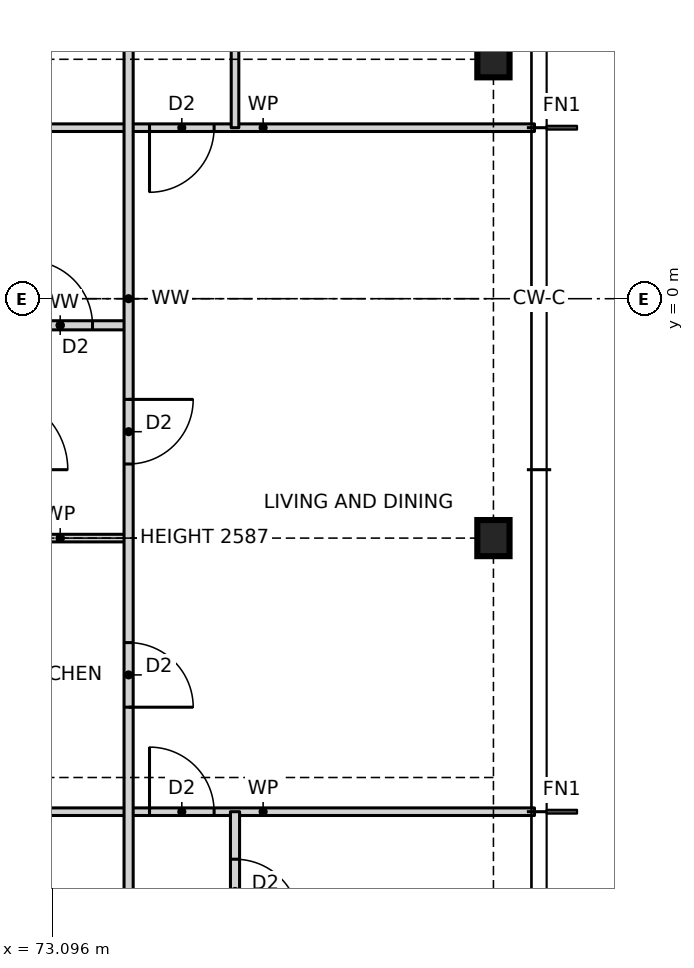
"""IFC4 building model, lengths in metres.
Left out: names, types, materials, properties, quantities, classifications, styles, units other than length and angle.
Written with IfcOpenShell. Run it as: python <this file> out.ifc"""

import sys

from ifc_helpers import new_model, si_unit, direction, frame, frame_2d, origin, origin_2d, place, context, subcontext, project, spatial, rectangle, i_section, extrude, element, fill, save


model = new_model("IFC4")
c1 = context("Model", 3, precision=1e-05, world=origin(), true_north=direction((0.0, 1.0)))
c2 = subcontext(c1, "Body", "Model", "MODEL_VIEW")
j1 = project(units=[si_unit("LENGTHUNIT", "METRE"), si_unit("PLANEANGLEUNIT", "RADIAN")], contexts=[c1])
p1 = place(None, origin())
s1 = spatial("IfcSite", under=j1, at=p1, CompositionType="ELEMENT")
p2 = place(p1, origin())
s2 = spatial("IfcBuilding", under=s1, at=p2, CompositionType="ELEMENT")
p3 = place(p2, frame((0.0, 0.0, 22.0)))
s3 = spatial("IfcBuildingStorey", under=s2, at=p3, CompositionType="ELEMENT", Elevation=22.0)
for number, where, z_axis, x_axis in (
    (1, (78.9, -3.15, 0.0), (0.0, 0.0, 1.0), (1.0, 0.0, 0.0)),
    (2, (78.9, 3.15, 0.0), (0.0, 0.0, 1.0), (1.0, 0.0, 0.0)),
):
    element("IfcColumn", number, at=place(p3, frame(where, z_axis=z_axis, x_axis=x_axis)), inside=s3, PredefinedType="COLUMN", context=c2, shape_type="SweptSolid", body=[
        extrude(i_section(OverallWidth=0.424, OverallDepth=0.475, WebThickness=0.048, FlangeThickness=0.077, at=origin_2d()), origin(), (0.0, 0.0, 1.0), 3.5),
    ])
p4 = place(p3, frame((72.3, -6.75, 0.0), z_axis=(0.0, 0.0, 1.0), x_axis=(1.0, 0.0, 0.0)))
e3 = element("IfcWall", 3, at=p4, inside=s3, PredefinedType="PARTITIONING", context=c2, shape_type="SweptSolid", body=[
    extrude(rectangle(XDim=7.14, YDim=0.1, at=frame_2d((3.57, 0.0))), origin(), (0.0, 0.0, 1.0), 3.27),
])
p5 = place(p4, frame((2.075, 0.0, 0.0)))
e4 = element("IfcOpeningElement", 4, at=p5, cuts=e3, PredefinedType="OPENING", context=c2, shape_type="SweptSolid", body=[
    extrude(rectangle(XDim=0.85, YDim=2.1, at=frame_2d((0.425, 1.05))), frame((0.0, 0.06, 0.0), z_axis=(0.0, -1.0, 0.0), x_axis=(1.0, 0.0, 0.0)), (0.0, 0.0, 1.0), 0.12),
])
p6 = place(p3, frame((72.3, -3.15, 0.0), z_axis=(0.0, 0.0, 1.0), x_axis=(1.0, 0.0, 0.0)))
e5 = element("IfcWall", 5, at=p6, inside=s3, PredefinedType="PARTITIONING", context=c2, shape_type="SweptSolid", body=[
    extrude(rectangle(XDim=1.8, YDim=0.1, at=frame_2d((0.9, 0.0))), origin(), (0.0, 0.0, 1.0), 2.587),
])
p7 = place(p3, frame((72.3, -0.35, 0.0), z_axis=(0.0, 0.0, 1.0), x_axis=(1.0, 0.0, 0.0)))
e6 = element("IfcWall", 6, at=p7, inside=s3, PredefinedType="PARTITIONING", context=c2, shape_type="SweptSolid", body=[
    extrude(rectangle(XDim=1.8, YDim=0.12, at=frame_2d((0.9, 0.0))), origin(), (0.0, 0.0, 1.0), 3.27),
])
p8 = place(p7, frame((0.475, 0.0, 0.0)))
e7 = element("IfcOpeningElement", 7, at=p8, cuts=e6, PredefinedType="OPENING", context=c2, shape_type="SweptSolid", body=[
    extrude(rectangle(XDim=0.85, YDim=2.1, at=frame_2d((0.425, 1.05))), frame((0.0, 0.07, 0.0), z_axis=(0.0, -1.0, 0.0), x_axis=(1.0, 0.0, 0.0)), (0.0, 0.0, 1.0), 0.14),
])
p9 = place(p3, frame((72.3, 2.25, 0.0), z_axis=(0.0, 0.0, 1.0), x_axis=(1.0, 0.0, 0.0)))
e8 = element("IfcWall", 8, at=p9, inside=s3, PredefinedType="PARTITIONING", context=c2, shape_type="SweptSolid", body=[
    extrude(rectangle(XDim=7.14, YDim=0.1, at=frame_2d((3.57, 0.0))), origin(), (0.0, 0.0, 1.0), 3.27),
])
p10 = place(p9, frame((2.075, 0.0, 0.0)))
e9 = element("IfcOpeningElement", 9, at=p10, cuts=e8, PredefinedType="OPENING", context=c2, shape_type="SweptSolid", body=[
    extrude(rectangle(XDim=0.85, YDim=2.1, at=frame_2d((0.425, 1.05))), frame((0.0, 0.06, 0.0), z_axis=(0.0, -1.0, 0.0), x_axis=(1.0, 0.0, 0.0)), (0.0, 0.0, 1.0), 0.12),
])
p11 = place(p3, frame((75.5, -13.45, 0.0), z_axis=(0.0, 0.0, 1.0), x_axis=(0.0, 1.0, 0.0)))
e10 = element("IfcWall", 10, at=p11, inside=s3, PredefinedType="PARTITIONING", context=c2, shape_type="SweptSolid", body=[
    extrude(rectangle(XDim=6.7, YDim=0.12, at=frame_2d((3.35, 0.0))), origin(), (0.0, 0.0, 1.0), 3.27),
])
p12 = place(p11, frame((5.225, 0.0, 0.0)))
e11 = element("IfcOpeningElement", 11, at=p12, cuts=e10, PredefinedType="OPENING", context=c2, shape_type="SweptSolid", body=[
    extrude(rectangle(XDim=0.85, YDim=2.1, at=frame_2d((0.425, 1.05))), frame((0.0, 0.07, 0.0), z_axis=(0.0, -1.0, 0.0), x_axis=(1.0, 0.0, 0.0)), (0.0, 0.0, 1.0), 0.14),
])
p13 = place(p11, frame((0.675, 0.0, 0.0)))
e12 = element("IfcOpeningElement", 12, at=p13, cuts=e10, PredefinedType="OPENING", context=c2, shape_type="SweptSolid", body=[
    extrude(rectangle(XDim=0.85, YDim=2.1, at=frame_2d((0.425, 1.05))), frame((0.0, 0.07, 0.0), z_axis=(0.0, -1.0, 0.0), x_axis=(1.0, 0.0, 0.0)), (0.0, 0.0, 1.0), 0.14),
])
p14 = place(p3, frame((75.5, 2.25, 0.0), z_axis=(0.0, 0.0, 1.0), x_axis=(0.0, 1.0, 0.0)))
e13 = element("IfcWall", 13, at=p14, inside=s3, PredefinedType="PARTITIONING", context=c2, shape_type="SweptSolid", body=[
    extrude(rectangle(XDim=11.2, YDim=0.1, at=frame_2d((5.6, 0.0))), origin(), (0.0, 0.0, 1.0), 3.27),
])
p15 = place(p14, frame((1.825, 0.0, 0.0)))
e14 = element("IfcOpeningElement", 14, at=p15, cuts=e13, PredefinedType="OPENING", context=c2, shape_type="SweptSolid", body=[
    extrude(rectangle(XDim=0.85, YDim=2.1, at=frame_2d((0.425, 1.05))), frame((0.0, 0.06, 0.0), z_axis=(0.0, -1.0, 0.0), x_axis=(1.0, 0.0, 0.0)), (0.0, 0.0, 1.0), 0.12),
])
p16 = place(p14, frame((6.325, 0.0, 0.0)))
e15 = element("IfcOpeningElement", 15, at=p16, cuts=e13, PredefinedType="OPENING", context=c2, shape_type="SweptSolid", body=[
    extrude(rectangle(XDim=0.85, YDim=2.1, at=frame_2d((0.425, 1.05))), frame((0.0, 0.06, 0.0), z_axis=(0.0, -1.0, 0.0), x_axis=(1.0, 0.0, 0.0)), (0.0, 0.0, 1.0), 0.12),
])
p17 = place(p14, frame((9.675, 0.0, 0.0)))
e16 = element("IfcOpeningElement", 16, at=p17, cuts=e13, PredefinedType="OPENING", context=c2, shape_type="SweptSolid", body=[
    extrude(rectangle(XDim=0.85, YDim=2.1, at=frame_2d((0.425, 1.05))), frame((0.0, 0.06, 0.0), z_axis=(0.0, -1.0, 0.0), x_axis=(1.0, 0.0, 0.0)), (0.0, 0.0, 1.0), 0.12),
])
p18 = place(p3, frame((74.1, -12.614, 0.0), z_axis=(0.0, 0.0, 1.0), x_axis=(0.0, 1.0, 0.0)))
e17 = element("IfcWall", 17, at=p18, inside=s3, PredefinedType="PARTITIONING", context=c2, shape_type="SweptSolid", body=[
    extrude(rectangle(XDim=25.228, YDim=0.12, at=frame_2d((12.614, 0.0))), origin(), (0.0, 0.0, 1.0), 3.27),
])
p19 = place(p18, frame((7.239, 0.0, 0.0)))
e18 = element("IfcOpeningElement", 18, at=p19, cuts=e17, PredefinedType="OPENING", context=c2, shape_type="SweptSolid", body=[
    extrude(rectangle(XDim=0.85, YDim=2.1, at=frame_2d((0.425, 1.05))), frame((0.0, 0.07, 0.0), z_axis=(0.0, -1.0, 0.0), x_axis=(1.0, 0.0, 0.0)), (0.0, 0.0, 1.0), 0.14),
])
p20 = place(p18, frame((10.439, 0.0, 0.0)))
e19 = element("IfcOpeningElement", 19, at=p20, cuts=e17, PredefinedType="OPENING", context=c2, shape_type="SweptSolid", body=[
    extrude(rectangle(XDim=0.85, YDim=2.1, at=frame_2d((0.425, 1.05))), frame((0.0, 0.07, 0.0), z_axis=(0.0, -1.0, 0.0), x_axis=(1.0, 0.0, 0.0)), (0.0, 0.0, 1.0), 0.14),
])
p21 = place(p18, frame((2.507, 0.0, 0.0)))
e20 = element("IfcOpeningElement", 20, at=p21, cuts=e17, PredefinedType="OPENING", context=c2, shape_type="SweptSolid", body=[
    extrude(rectangle(XDim=0.85, YDim=2.1, at=frame_2d((0.425, 1.05))), frame((0.0, 0.07, 0.0), z_axis=(0.0, -1.0, 0.0), x_axis=(1.0, 0.0, 0.0)), (0.0, 0.0, 1.0), 0.14),
])
p22 = place(p18, frame((16.639, 0.0, 0.0)))
e21 = element("IfcOpeningElement", 21, at=p22, cuts=e17, PredefinedType="OPENING", context=c2, shape_type="SweptSolid", body=[
    extrude(rectangle(XDim=0.85, YDim=2.1, at=frame_2d((0.425, 1.05))), frame((0.0, 0.07, 0.0), z_axis=(0.0, -1.0, 0.0), x_axis=(1.0, 0.0, 0.0)), (0.0, 0.0, 1.0), 0.14),
])
p23 = place(p18, frame((21.821, 0.0, 0.0)))
e22 = element("IfcOpeningElement", 22, at=p23, cuts=e17, PredefinedType="OPENING", context=c2, shape_type="SweptSolid", body=[
    extrude(rectangle(XDim=0.85, YDim=2.1, at=frame_2d((0.425, 1.05))), frame((0.0, 0.07, 0.0), z_axis=(0.0, -1.0, 0.0), x_axis=(1.0, 0.0, 0.0)), (0.0, 0.0, 1.0), 0.14),
])
p24 = place(p19, frame((0.85, 0.0, 0.0), z_axis=(0.0, 0.0, 1.0), x_axis=(-1.0, 0.0, 0.0)))
e23 = element("IfcDoor", 23, at=p24, inside=s3, OperationType="SINGLE_SWING_RIGHT", PredefinedType="DOOR", context=c2, shape_type="SweptSolid", body=[
    extrude(rectangle(XDim=0.85, YDim=2.1, at=frame_2d((0.425, 1.05))), frame((0.0, 0.025, 0.0), z_axis=(0.0, -1.0, 0.0), x_axis=(1.0, 0.0, 0.0)), (0.0, 0.0, 1.0), 0.05),
])
fill(e18, e23)
p25 = place(p20, frame((0.85, 0.0, 0.0), z_axis=(0.0, 0.0, 1.0), x_axis=(-1.0, 0.0, 0.0)))
e24 = element("IfcDoor", 24, at=p25, inside=s3, OperationType="SINGLE_SWING_LEFT", PredefinedType="DOOR", context=c2, shape_type="SweptSolid", body=[
    extrude(rectangle(XDim=0.85, YDim=2.1, at=frame_2d((0.425, 1.05))), frame((0.0, 0.025, 0.0), z_axis=(0.0, -1.0, 0.0), x_axis=(1.0, 0.0, 0.0)), (0.0, 0.0, 1.0), 0.05),
])
fill(e19, e24)
p26 = place(p8, origin())
e25 = element("IfcDoor", 25, at=p26, inside=s3, OperationType="SINGLE_SWING_LEFT", PredefinedType="DOOR", context=c2, shape_type="SweptSolid", body=[
    extrude(rectangle(XDim=0.85, YDim=2.1, at=frame_2d((0.425, 1.05))), frame((0.0, 0.025, 0.0), z_axis=(0.0, -1.0, 0.0), x_axis=(1.0, 0.0, 0.0)), (0.0, 0.0, 1.0), 0.05),
])
fill(e7, e25)
p27 = place(p5, origin())
e26 = element("IfcDoor", 26, at=p27, inside=s3, OperationType="SINGLE_SWING_LEFT", PredefinedType="DOOR", context=c2, shape_type="SweptSolid", body=[
    extrude(rectangle(XDim=0.85, YDim=2.1, at=frame_2d((0.425, 1.05))), frame((0.0, 0.025, 0.0), z_axis=(0.0, -1.0, 0.0), x_axis=(1.0, 0.0, 0.0)), (0.0, 0.0, 1.0), 0.05),
])
fill(e4, e26)
p28 = place(p12, frame((0.85, 0.0, 0.0), z_axis=(0.0, 0.0, 1.0), x_axis=(-1.0, 0.0, 0.0)))
e27 = element("IfcDoor", 27, at=p28, inside=s3, OperationType="SINGLE_SWING_RIGHT", PredefinedType="DOOR", context=c2, shape_type="SweptSolid", body=[
    extrude(rectangle(XDim=0.85, YDim=2.1, at=frame_2d((0.425, 1.05))), frame((0.0, 0.025, 0.0), z_axis=(0.0, -1.0, 0.0), x_axis=(1.0, 0.0, 0.0)), (0.0, 0.0, 1.0), 0.05),
])
fill(e11, e27)
p29 = place(p10, frame((0.85, 0.0, 0.0), z_axis=(0.0, 0.0, 1.0), x_axis=(-1.0, 0.0, 0.0)))
e28 = element("IfcDoor", 28, at=p29, inside=s3, OperationType="SINGLE_SWING_RIGHT", PredefinedType="DOOR", context=c2, shape_type="SweptSolid", body=[
    extrude(rectangle(XDim=0.85, YDim=2.1, at=frame_2d((0.425, 1.05))), frame((0.0, 0.025, 0.0), z_axis=(0.0, -1.0, 0.0), x_axis=(1.0, 0.0, 0.0)), (0.0, 0.0, 1.0), 0.05),
])
fill(e9, e28)
save(model, sys.argv[1])
